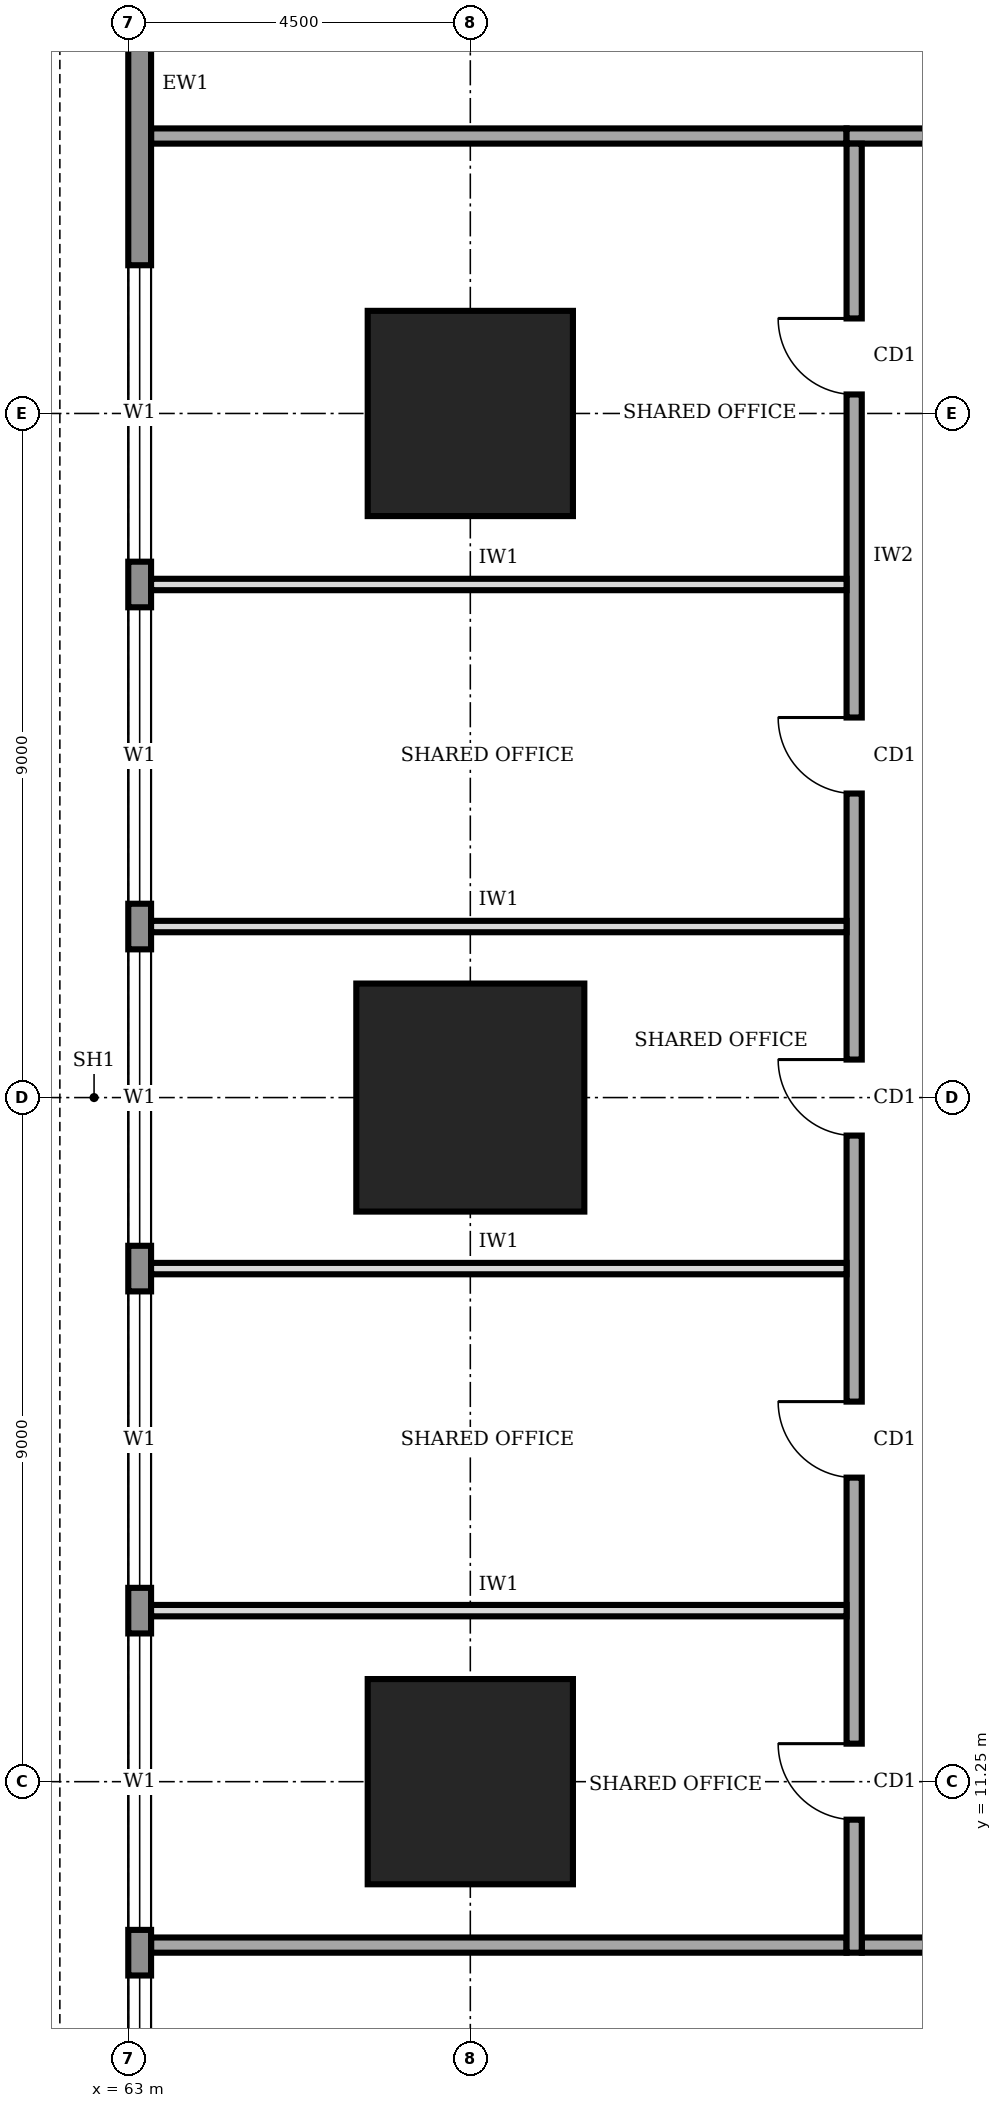
"""IFC4 building model, lengths in metres.
Left out: names, types, materials, properties, quantities, classifications, styles, units other than length and angle.
Written with IfcOpenShell. Run it as: python <this file> out.ifc"""

import sys

from ifc_helpers import new_model, si_unit, direction, frame, frame_2d, origin, origin_2d, place, context, subcontext, project, spatial, rectangle, extrude, element, fill, save


model = new_model("IFC4")
c1 = context("Model", 3, precision=1e-05, world=origin(), true_north=direction((0.0, 1.0)))
c2 = subcontext(c1, "Body", "Model", "MODEL_VIEW")
j1 = project(units=[si_unit("LENGTHUNIT", "METRE"), si_unit("PLANEANGLEUNIT", "RADIAN")], contexts=[c1])
p1 = place(None, origin())
s1 = spatial("IfcSite", under=j1, at=p1, CompositionType="ELEMENT")
p2 = place(p1, origin())
s2 = spatial("IfcBuilding", under=s1, at=p2, CompositionType="ELEMENT")
p3 = place(p2, frame((0.0, 0.0, 25.0)))
s3 = spatial("IfcBuildingStorey", under=s2, at=p3, CompositionType="ELEMENT", Elevation=25.0)
p4 = place(p3, frame((67.5, 11.25, 0.0), z_axis=(0.0, 0.0, 1.0), x_axis=(1.0, 0.0, 0.0)))
e1 = element("IfcColumn", 1, at=p4, inside=s3, PredefinedType="COLUMN", context=c2, shape_type="SweptSolid", body=[
    extrude(rectangle(XDim=2.7, YDim=2.7, at=origin_2d()), origin(), (0.0, 0.0, 1.0), 4.0),
])
p5 = place(p3, frame((67.5, 20.25, 0.0), z_axis=(0.0, 0.0, 1.0), x_axis=(1.0, 0.0, 0.0)))
e2 = element("IfcColumn", 2, at=p5, inside=s3, PredefinedType="COLUMN", context=c2, shape_type="SweptSolid", body=[
    extrude(rectangle(XDim=3.0, YDim=3.0, at=origin_2d()), origin(), (0.0, 0.0, 1.0), 4.0),
])
p6 = place(p3, frame((67.5, 29.25, 0.0), z_axis=(0.0, 0.0, 1.0), x_axis=(1.0, 0.0, 0.0)))
e3 = element("IfcColumn", 3, at=p6, inside=s3, PredefinedType="COLUMN", context=c2, shape_type="SweptSolid", body=[
    extrude(rectangle(XDim=2.7, YDim=2.7, at=origin_2d()), origin(), (0.0, 0.0, 1.0), 4.0),
])
p7 = place(p3, frame((63.15, 35.98, 0.0), z_axis=(0.0, 0.0, 1.0), x_axis=(0.0, -1.0, 0.0)))
e4 = element("IfcWall", 4, at=p7, inside=s3, PredefinedType="STANDARD", context=c2, shape_type="SweptSolid", body=[
    extrude(rectangle(XDim=31.46, YDim=0.3, at=frame_2d((15.73, 0.0))), origin(), (0.0, 0.0, 1.0), 3.75),
])
p8 = place(p7, frame((27.28, 0.0, 0.9)))
e5 = element("IfcOpeningElement", 5, at=p8, cuts=e4, PredefinedType="OPENING", context=c2, shape_type="SweptSolid", body=[
    extrude(rectangle(XDim=3.9, YDim=2.2, at=frame_2d((1.95, 1.1))), frame((0.0, 0.16, 0.0), z_axis=(0.0, -1.0, 0.0), x_axis=(1.0, 0.0, 0.0)), (0.0, 0.0, 1.0), 0.32),
])
p9 = place(p7, frame((22.78, 0.0, 0.9)))
e6 = element("IfcOpeningElement", 6, at=p9, cuts=e4, PredefinedType="OPENING", context=c2, shape_type="SweptSolid", body=[
    extrude(rectangle(XDim=3.9, YDim=2.2, at=frame_2d((1.95, 1.1))), frame((0.0, 0.16, 0.0), z_axis=(0.0, -1.0, 0.0), x_axis=(1.0, 0.0, 0.0)), (0.0, 0.0, 1.0), 0.32),
])
p10 = place(p7, frame((18.28, 0.0, 0.9)))
e7 = element("IfcOpeningElement", 7, at=p10, cuts=e4, PredefinedType="OPENING", context=c2, shape_type="SweptSolid", body=[
    extrude(rectangle(XDim=3.9, YDim=2.2, at=frame_2d((1.95, 1.1))), frame((0.0, 0.16, 0.0), z_axis=(0.0, -1.0, 0.0), x_axis=(1.0, 0.0, 0.0)), (0.0, 0.0, 1.0), 0.32),
])
p11 = place(p7, frame((13.78, 0.0, 0.9)))
e8 = element("IfcOpeningElement", 8, at=p11, cuts=e4, PredefinedType="OPENING", context=c2, shape_type="SweptSolid", body=[
    extrude(rectangle(XDim=3.9, YDim=2.2, at=frame_2d((1.95, 1.1))), frame((0.0, 0.16, 0.0), z_axis=(0.0, -1.0, 0.0), x_axis=(1.0, 0.0, 0.0)), (0.0, 0.0, 1.0), 0.32),
])
p12 = place(p7, frame((9.28, 0.0, 0.9)))
e9 = element("IfcOpeningElement", 9, at=p12, cuts=e4, PredefinedType="OPENING", context=c2, shape_type="SweptSolid", body=[
    extrude(rectangle(XDim=3.9, YDim=2.2, at=frame_2d((1.95, 1.1))), frame((0.0, 0.16, 0.0), z_axis=(0.0, -1.0, 0.0), x_axis=(1.0, 0.0, 0.0)), (0.0, 0.0, 1.0), 0.32),
])
p13 = place(p7, frame((4.78, 0.0, 0.9)))
e10 = element("IfcOpeningElement", 10, at=p13, cuts=e4, PredefinedType="OPENING", context=c2, shape_type="SweptSolid", body=[
    extrude(rectangle(XDim=3.9, YDim=2.2, at=frame_2d((1.95, 1.1))), frame((0.0, 0.16, 0.0), z_axis=(0.0, -1.0, 0.0), x_axis=(1.0, 0.0, 0.0)), (0.0, 0.0, 1.0), 0.32),
])
p14 = place(p3, frame((72.65, 9.1, 0.0), z_axis=(0.0, 0.0, 1.0), x_axis=(1.0, 0.0, 0.0)))
e11 = element("IfcWall", 11, at=p14, inside=s3, PredefinedType="SOLIDWALL", context=c2, shape_type="SweptSolid", body=[
    extrude(rectangle(XDim=16.9, YDim=0.2, at=frame_2d((8.45, 0.0))), origin(), (0.0, 0.0, 1.0), 3.75),
])
p15 = place(p14, frame((0.925, 0.0, 0.0)))
e12 = element("IfcOpeningElement", 12, at=p15, cuts=e11, PredefinedType="OPENING", context=c2, shape_type="SweptSolid", body=[
    extrude(rectangle(XDim=1.8, YDim=2.1, at=frame_2d((0.9, 1.05))), frame((0.0, 0.11, 0.0), z_axis=(0.0, -1.0, 0.0), x_axis=(1.0, 0.0, 0.0)), (0.0, 0.0, 1.0), 0.22),
])
p16 = place(p14, frame((7.85, 0.0, 0.0)))
e13 = element("IfcOpeningElement", 13, at=p16, cuts=e11, PredefinedType="OPENING", context=c2, shape_type="SweptSolid", body=[
    extrude(rectangle(XDim=1.0, YDim=2.1, at=frame_2d((0.5, 1.05))), frame((0.0, 0.11, 0.0), z_axis=(0.0, -1.0, 0.0), x_axis=(1.0, 0.0, 0.0)), (0.0, 0.0, 1.0), 0.22),
])
p17 = place(p14, frame((13.975, 0.0, 0.0)))
e14 = element("IfcOpeningElement", 14, at=p17, cuts=e11, PredefinedType="OPENING", context=c2, shape_type="SweptSolid", body=[
    extrude(rectangle(XDim=1.8, YDim=2.1, at=frame_2d((0.9, 1.05))), frame((0.0, 0.11, 0.0), z_axis=(0.0, -1.0, 0.0), x_axis=(1.0, 0.0, 0.0)), (0.0, 0.0, 1.0), 0.22),
])
p18 = place(p3, frame((89.35, 32.9, 0.0), z_axis=(0.0, 0.0, 1.0), x_axis=(-1.0, 0.0, 0.0)))
e15 = element("IfcWall", 15, at=p18, inside=s3, PredefinedType="SOLIDWALL", context=c2, shape_type="SweptSolid", body=[
    extrude(rectangle(XDim=16.9, YDim=0.2, at=frame_2d((8.45, 0.0))), origin(), (0.0, 0.0, 1.0), 3.75),
])
p19 = place(p18, frame((14.375, 0.0, 0.0)))
e16 = element("IfcOpeningElement", 16, at=p19, cuts=e15, PredefinedType="OPENING", context=c2, shape_type="SweptSolid", body=[
    extrude(rectangle(XDim=1.0, YDim=2.1, at=frame_2d((0.5, 1.05))), frame((0.0, 0.11, 0.0), z_axis=(0.0, -1.0, 0.0), x_axis=(1.0, 0.0, 0.0)), (0.0, 0.0, 1.0), 0.22),
])
p20 = place(p18, frame((7.85, 0.0, 0.0)))
e17 = element("IfcOpeningElement", 17, at=p20, cuts=e15, PredefinedType="OPENING", context=c2, shape_type="SweptSolid", body=[
    extrude(rectangle(XDim=1.0, YDim=2.1, at=frame_2d((0.5, 1.05))), frame((0.0, 0.11, 0.0), z_axis=(0.0, -1.0, 0.0), x_axis=(1.0, 0.0, 0.0)), (0.0, 0.0, 1.0), 0.22),
])
p21 = place(p18, frame((1.325, 0.0, 0.0)))
e18 = element("IfcOpeningElement", 18, at=p21, cuts=e15, PredefinedType="OPENING", context=c2, shape_type="SweptSolid", body=[
    extrude(rectangle(XDim=1.0, YDim=2.1, at=frame_2d((0.5, 1.05))), frame((0.0, 0.11, 0.0), z_axis=(0.0, -1.0, 0.0), x_axis=(1.0, 0.0, 0.0)), (0.0, 0.0, 1.0), 0.22),
])
p22 = place(p3, frame((72.55, 32.8, 0.0), z_axis=(0.0, 0.0, 1.0), x_axis=(0.0, -1.0, 0.0)))
e19 = element("IfcWall", 19, at=p22, inside=s3, PredefinedType="SOLIDWALL", context=c2, shape_type="SweptSolid", body=[
    extrude(rectangle(XDim=23.8, YDim=0.2, at=frame_2d((11.9, 0.0))), origin(), (0.0, 0.0, 1.0), 3.75),
])
p23 = place(p22, frame((21.05, 0.0, 0.0)))
e20 = element("IfcOpeningElement", 20, at=p23, cuts=e19, PredefinedType="OPENING", context=c2, shape_type="SweptSolid", body=[
    extrude(rectangle(XDim=1.0, YDim=2.1, at=frame_2d((0.5, 1.05))), frame((0.0, 0.11, 0.0), z_axis=(0.0, -1.0, 0.0), x_axis=(1.0, 0.0, 0.0)), (0.0, 0.0, 1.0), 0.22),
])
p24 = place(p22, frame((16.55, 0.0, 0.0)))
e21 = element("IfcOpeningElement", 21, at=p24, cuts=e19, PredefinedType="OPENING", context=c2, shape_type="SweptSolid", body=[
    extrude(rectangle(XDim=1.0, YDim=2.1, at=frame_2d((0.5, 1.05))), frame((0.0, 0.11, 0.0), z_axis=(0.0, -1.0, 0.0), x_axis=(1.0, 0.0, 0.0)), (0.0, 0.0, 1.0), 0.22),
])
p25 = place(p22, frame((12.05, 0.0, 0.0)))
e22 = element("IfcOpeningElement", 22, at=p25, cuts=e19, PredefinedType="OPENING", context=c2, shape_type="SweptSolid", body=[
    extrude(rectangle(XDim=1.0, YDim=2.1, at=frame_2d((0.5, 1.05))), frame((0.0, 0.11, 0.0), z_axis=(0.0, -1.0, 0.0), x_axis=(1.0, 0.0, 0.0)), (0.0, 0.0, 1.0), 0.22),
])
p26 = place(p22, frame((7.55, 0.0, 0.0)))
e23 = element("IfcOpeningElement", 23, at=p26, cuts=e19, PredefinedType="OPENING", context=c2, shape_type="SweptSolid", body=[
    extrude(rectangle(XDim=1.0, YDim=2.1, at=frame_2d((0.5, 1.05))), frame((0.0, 0.11, 0.0), z_axis=(0.0, -1.0, 0.0), x_axis=(1.0, 0.0, 0.0)), (0.0, 0.0, 1.0), 0.22),
])
p27 = place(p22, frame((2.3, 0.0, 0.0)))
e24 = element("IfcOpeningElement", 24, at=p27, cuts=e19, PredefinedType="OPENING", context=c2, shape_type="SweptSolid", body=[
    extrude(rectangle(XDim=1.0, YDim=2.1, at=frame_2d((0.5, 1.05))), frame((0.0, 0.11, 0.0), z_axis=(0.0, -1.0, 0.0), x_axis=(1.0, 0.0, 0.0)), (0.0, 0.0, 1.0), 0.22),
])
for number, where, z_axis, x_axis in (
    (25, (63.3, 9.1, 0.0), (0.0, 0.0, 1.0), (1.0, 0.0, 0.0)),
    (26, (63.3, 32.9, 0.0), (0.0, 0.0, 1.0), (1.0, 0.0, 0.0)),
):
    element("IfcWall", number, at=place(p3, frame(where, z_axis=z_axis, x_axis=x_axis)), inside=s3, PredefinedType="SOLIDWALL", context=c2, shape_type="SweptSolid", body=[
        extrude(rectangle(XDim=9.15, YDim=0.2, at=frame_2d((4.575, 0.0))), origin(), (0.0, 0.0, 1.0), 3.75),
    ])
for number, where, z_axis, x_axis in (
    (27, (63.3, 13.5, 0.0), (0.0, 0.0, 1.0), (1.0, 0.0, 0.0)),
    (28, (63.3, 18.0, 0.0), (0.0, 0.0, 1.0), (1.0, 0.0, 0.0)),
    (29, (63.3, 22.5, 0.0), (0.0, 0.0, 1.0), (1.0, 0.0, 0.0)),
    (30, (63.3, 27.0, 0.0), (0.0, 0.0, 1.0), (1.0, 0.0, 0.0)),
):
    element("IfcWall", number, at=place(p3, frame(where, z_axis=z_axis, x_axis=x_axis)), inside=s3, PredefinedType="PARTITIONING", context=c2, shape_type="SweptSolid", body=[
        extrude(rectangle(XDim=9.15, YDim=0.15, at=frame_2d((4.575, 0.0))), origin(), (0.0, 0.0, 1.0), 3.75),
    ])
p28 = place(p8, origin())
e31 = element("IfcWindow", 31, at=p28, inside=s3, PartitioningType="SINGLE_PANEL", PredefinedType="WINDOW", context=c2, shape_type="SweptSolid", body=[
    extrude(rectangle(XDim=3.9, YDim=2.2, at=frame_2d((1.95, 1.1))), frame((0.0, 0.03, 0.0), z_axis=(0.0, -1.0, 0.0), x_axis=(1.0, 0.0, 0.0)), (0.0, 0.0, 1.0), 0.06),
])
fill(e5, e31)
p29 = place(p9, origin())
e32 = element("IfcWindow", 32, at=p29, inside=s3, PartitioningType="SINGLE_PANEL", PredefinedType="WINDOW", context=c2, shape_type="SweptSolid", body=[
    extrude(rectangle(XDim=3.9, YDim=2.2, at=frame_2d((1.95, 1.1))), frame((0.0, 0.03, 0.0), z_axis=(0.0, -1.0, 0.0), x_axis=(1.0, 0.0, 0.0)), (0.0, 0.0, 1.0), 0.06),
])
fill(e6, e32)
p30 = place(p10, origin())
e33 = element("IfcWindow", 33, at=p30, inside=s3, PartitioningType="SINGLE_PANEL", PredefinedType="WINDOW", context=c2, shape_type="SweptSolid", body=[
    extrude(rectangle(XDim=3.9, YDim=2.2, at=frame_2d((1.95, 1.1))), frame((0.0, 0.03, 0.0), z_axis=(0.0, -1.0, 0.0), x_axis=(1.0, 0.0, 0.0)), (0.0, 0.0, 1.0), 0.06),
])
fill(e7, e33)
p31 = place(p11, origin())
e34 = element("IfcWindow", 34, at=p31, inside=s3, PartitioningType="SINGLE_PANEL", PredefinedType="WINDOW", context=c2, shape_type="SweptSolid", body=[
    extrude(rectangle(XDim=3.9, YDim=2.2, at=frame_2d((1.95, 1.1))), frame((0.0, 0.03, 0.0), z_axis=(0.0, -1.0, 0.0), x_axis=(1.0, 0.0, 0.0)), (0.0, 0.0, 1.0), 0.06),
])
fill(e8, e34)
p32 = place(p12, origin())
e35 = element("IfcWindow", 35, at=p32, inside=s3, PartitioningType="SINGLE_PANEL", PredefinedType="WINDOW", context=c2, shape_type="SweptSolid", body=[
    extrude(rectangle(XDim=3.9, YDim=2.2, at=frame_2d((1.95, 1.1))), frame((0.0, 0.03, 0.0), z_axis=(0.0, -1.0, 0.0), x_axis=(1.0, 0.0, 0.0)), (0.0, 0.0, 1.0), 0.06),
])
fill(e9, e35)
p33 = place(p13, origin())
e36 = element("IfcWindow", 36, at=p33, inside=s3, PartitioningType="SINGLE_PANEL", PredefinedType="WINDOW", context=c2, shape_type="SweptSolid", body=[
    extrude(rectangle(XDim=3.9, YDim=2.2, at=frame_2d((1.95, 1.1))), frame((0.0, 0.03, 0.0), z_axis=(0.0, -1.0, 0.0), x_axis=(1.0, 0.0, 0.0)), (0.0, 0.0, 1.0), 0.06),
])
fill(e10, e36)
p34 = place(p23, frame((1.0, 0.0, 0.0), z_axis=(0.0, 0.0, 1.0), x_axis=(-1.0, 0.0, 0.0)))
e37 = element("IfcDoor", 37, at=p34, inside=s3, OperationType="SINGLE_SWING_RIGHT", PredefinedType="DOOR", context=c2, shape_type="SweptSolid", body=[
    extrude(rectangle(XDim=1.0, YDim=2.1, at=frame_2d((0.5, 1.05))), frame((0.0, 0.025, 0.0), z_axis=(0.0, -1.0, 0.0), x_axis=(1.0, 0.0, 0.0)), (0.0, 0.0, 1.0), 0.05),
])
fill(e20, e37)
p35 = place(p24, frame((1.0, 0.0, 0.0), z_axis=(0.0, 0.0, 1.0), x_axis=(-1.0, 0.0, 0.0)))
e38 = element("IfcDoor", 38, at=p35, inside=s3, OperationType="SINGLE_SWING_RIGHT", PredefinedType="DOOR", context=c2, shape_type="SweptSolid", body=[
    extrude(rectangle(XDim=1.0, YDim=2.1, at=frame_2d((0.5, 1.05))), frame((0.0, 0.025, 0.0), z_axis=(0.0, -1.0, 0.0), x_axis=(1.0, 0.0, 0.0)), (0.0, 0.0, 1.0), 0.05),
])
fill(e21, e38)
p36 = place(p25, frame((1.0, 0.0, 0.0), z_axis=(0.0, 0.0, 1.0), x_axis=(-1.0, 0.0, 0.0)))
e39 = element("IfcDoor", 39, at=p36, inside=s3, OperationType="SINGLE_SWING_RIGHT", PredefinedType="DOOR", context=c2, shape_type="SweptSolid", body=[
    extrude(rectangle(XDim=1.0, YDim=2.1, at=frame_2d((0.5, 1.05))), frame((0.0, 0.025, 0.0), z_axis=(0.0, -1.0, 0.0), x_axis=(1.0, 0.0, 0.0)), (0.0, 0.0, 1.0), 0.05),
])
fill(e22, e39)
p37 = place(p26, frame((1.0, 0.0, 0.0), z_axis=(0.0, 0.0, 1.0), x_axis=(-1.0, 0.0, 0.0)))
e40 = element("IfcDoor", 40, at=p37, inside=s3, OperationType="SINGLE_SWING_RIGHT", PredefinedType="DOOR", context=c2, shape_type="SweptSolid", body=[
    extrude(rectangle(XDim=1.0, YDim=2.1, at=frame_2d((0.5, 1.05))), frame((0.0, 0.025, 0.0), z_axis=(0.0, -1.0, 0.0), x_axis=(1.0, 0.0, 0.0)), (0.0, 0.0, 1.0), 0.05),
])
fill(e23, e40)
p38 = place(p27, frame((1.0, 0.0, 0.0), z_axis=(0.0, 0.0, 1.0), x_axis=(-1.0, 0.0, 0.0)))
e41 = element("IfcDoor", 41, at=p38, inside=s3, OperationType="SINGLE_SWING_RIGHT", PredefinedType="DOOR", context=c2, shape_type="SweptSolid", body=[
    extrude(rectangle(XDim=1.0, YDim=2.1, at=frame_2d((0.5, 1.05))), frame((0.0, 0.025, 0.0), z_axis=(0.0, -1.0, 0.0), x_axis=(1.0, 0.0, 0.0)), (0.0, 0.0, 1.0), 0.05),
])
fill(e24, e41)
save(model, sys.argv[1])
